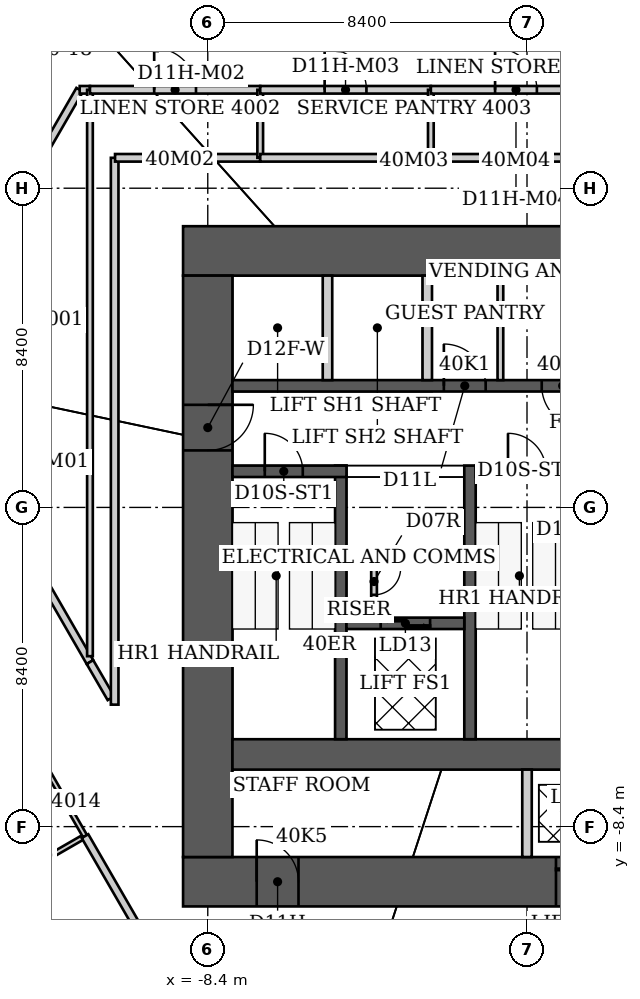
"""IFC4 building model, lengths in metres.
Left out: names, types, materials, properties, quantities, classifications, styles, units other than length and angle.
Written with IfcOpenShell. Run it as: python <this file> out.ifc"""

import sys

from ifc_helpers import new_model, si_unit, direction, frame, frame_2d, origin, place, context, subcontext, project, spatial, rectangle, extrude, element, fill, save


model = new_model("IFC4")
c1 = context("Model", 3, precision=1e-05, world=origin(), true_north=direction((0.0, 1.0)))
c2 = subcontext(c1, "Body", "Model", "MODEL_VIEW")
j1 = project(units=[si_unit("LENGTHUNIT", "METRE"), si_unit("PLANEANGLEUNIT", "RADIAN")], contexts=[c1])
p1 = place(None, origin())
s1 = spatial("IfcSite", under=j1, at=p1, CompositionType="ELEMENT")
p2 = place(p1, origin())
s2 = spatial("IfcBuilding", under=s1, at=p2, CompositionType="ELEMENT")
p3 = place(p2, frame((0.0, 0.0, 161.4)))
s3 = spatial("IfcBuildingStorey", under=s2, at=p3, CompositionType="ELEMENT", Elevation=161.4)
p4 = place(p3, frame((-9.05, 6.75, 0.0), z_axis=(0.0, 0.0, 1.0), x_axis=(1.0, 0.0, 0.0)))
e1 = element("IfcWall", 1, at=p4, inside=s3, PredefinedType="SHEAR", context=c2, shape_type="SweptSolid", body=[
    extrude(rectangle(XDim=18.1, YDim=1.3, at=frame_2d((9.05, 0.0))), origin(), (0.0, 0.0, 1.0), 3.8),
])
p5 = place(p3, frame((-9.05, -9.85, 0.0), z_axis=(0.0, 0.0, 1.0), x_axis=(1.0, 0.0, 0.0)))
e2 = element("IfcWall", 2, at=p5, inside=s3, PredefinedType="SHEAR", context=c2, shape_type="SweptSolid", body=[
    extrude(rectangle(XDim=18.1, YDim=1.3, at=frame_2d((9.05, 0.0))), origin(), (0.0, 0.0, 1.0), 3.8),
])
p6 = place(p5, frame((1.938, 0.0, 0.0)))
e3 = element("IfcOpeningElement", 3, at=p6, cuts=e2, PredefinedType="OPENING", context=c2, shape_type="SweptSolid", body=[
    extrude(rectangle(XDim=1.1, YDim=2.2, at=frame_2d((0.55, 1.1))), frame((0.0, 0.65, 0.0), z_axis=(0.0, -1.0, 0.0), x_axis=(1.0, 0.0, 0.0)), (0.0, 0.0, 1.0), 1.3),
])
p7 = place(p5, frame((9.812, 0.0, 0.0)))
e4 = element("IfcOpeningElement", 4, at=p7, cuts=e2, PredefinedType="OPENING", context=c2, shape_type="SweptSolid", body=[
    extrude(rectangle(XDim=1.1, YDim=2.1, at=frame_2d((0.55, 1.05))), frame((0.0, 0.65, 0.0), z_axis=(0.0, -1.0, 0.0), x_axis=(1.0, 0.0, 0.0)), (0.0, 0.0, 1.0), 1.3),
])
p8 = place(p5, frame((12.438, 0.0, 0.0)))
e5 = element("IfcOpeningElement", 5, at=p8, cuts=e2, PredefinedType="OPENING", context=c2, shape_type="SweptSolid", body=[
    extrude(rectangle(XDim=1.1, YDim=2.1, at=frame_2d((0.55, 1.05))), frame((0.0, 0.65, 0.0), z_axis=(0.0, -1.0, 0.0), x_axis=(1.0, 0.0, 0.0)), (0.0, 0.0, 1.0), 1.3),
])
p9 = place(p5, frame((15.062, 0.0, 0.0)))
e6 = element("IfcOpeningElement", 6, at=p9, cuts=e2, PredefinedType="OPENING", context=c2, shape_type="SweptSolid", body=[
    extrude(rectangle(XDim=1.1, YDim=2.1, at=frame_2d((0.55, 1.05))), frame((0.0, 0.65, 0.0), z_axis=(0.0, -1.0, 0.0), x_axis=(1.0, 0.0, 0.0)), (0.0, 0.0, 1.0), 1.3),
])
p10 = place(p3, frame((-8.4, -9.2, 0.0), z_axis=(0.0, 0.0, 1.0), x_axis=(0.0, 1.0, 0.0)))
e7 = element("IfcWall", 7, at=p10, inside=s3, PredefinedType="SHEAR", context=c2, shape_type="SweptSolid", body=[
    extrude(rectangle(XDim=15.3, YDim=1.3, at=frame_2d((7.65, 0.0))), origin(), (0.0, 0.0, 1.0), 3.8),
])
p11 = place(p10, frame((10.7, 0.0, 0.0)))
e8 = element("IfcOpeningElement", 8, at=p11, cuts=e7, PredefinedType="OPENING", context=c2, shape_type="SweptSolid", body=[
    extrude(rectangle(XDim=1.2, YDim=2.2, at=frame_2d((0.6, 1.1))), frame((0.0, 0.65, 0.0), z_axis=(0.0, -1.0, 0.0), x_axis=(1.0, 0.0, 0.0)), (0.0, 0.0, 1.0), 1.3),
])
p12 = place(p3, frame((-7.75, -6.5, 0.0), z_axis=(0.0, 0.0, 1.0), x_axis=(1.0, 0.0, 0.0)))
e9 = element("IfcWall", 9, at=p12, inside=s3, PredefinedType="SHEAR", context=c2, shape_type="SweptSolid", body=[
    extrude(rectangle(XDim=15.5, YDim=0.8, at=frame_2d((7.75, 0.0))), origin(), (0.0, 0.0, 1.0), 3.8),
])
for number, where, z_axis, x_axis in (
    (10, (-4.9, -6.1, 0.0), (0.0, 0.0, 1.0), (0.0, 1.0, 0.0)),
    (11, (-1.5, -6.1, 0.0), (0.0, 0.0, 1.0), (0.0, 1.0, 0.0)),
):
    element("IfcWall", number, at=place(p3, frame(where, z_axis=z_axis, x_axis=x_axis)), inside=s3, PredefinedType="SHEAR", context=c2, shape_type="SweptSolid", body=[
        extrude(rectangle(XDim=7.2, YDim=0.3, at=frame_2d((3.6, 0.0))), origin(), (0.0, 0.0, 1.0), 3.8),
    ])
p13 = place(p3, frame((-7.75, 0.95, 0.0), z_axis=(0.0, 0.0, 1.0), x_axis=(1.0, 0.0, 0.0)))
e12 = element("IfcWall", 12, at=p13, inside=s3, PredefinedType="SHEAR", context=c2, shape_type="SweptSolid", body=[
    extrude(rectangle(XDim=3.0, YDim=0.3, at=frame_2d((1.5, 0.0))), origin(), (0.0, 0.0, 1.0), 3.8),
])
p14 = place(p13, frame((0.85, 0.0, 0.0)))
e13 = element("IfcOpeningElement", 13, at=p14, cuts=e12, PredefinedType="OPENING", context=c2, shape_type="SweptSolid", body=[
    extrude(rectangle(XDim=1.0, YDim=2.2, at=frame_2d((0.5, 1.1))), frame((0.0, 0.15, 0.0), z_axis=(0.0, -1.0, 0.0), x_axis=(1.0, 0.0, 0.0)), (0.0, 0.0, 1.0), 0.3),
])
p15 = place(p3, frame((-1.35, 0.95, 0.0), z_axis=(0.0, 0.0, 1.0), x_axis=(1.0, 0.0, 0.0)))
e14 = element("IfcWall", 14, at=p15, inside=s3, PredefinedType="SHEAR", context=c2, shape_type="SweptSolid", body=[
    extrude(rectangle(XDim=2.7, YDim=0.3, at=frame_2d((1.35, 0.0))), origin(), (0.0, 0.0, 1.0), 3.8),
])
p16 = place(p15, frame((0.85, 0.0, 0.0)))
e15 = element("IfcOpeningElement", 15, at=p16, cuts=e14, PredefinedType="OPENING", context=c2, shape_type="SweptSolid", body=[
    extrude(rectangle(XDim=1.0, YDim=2.2, at=frame_2d((0.5, 1.1))), frame((0.0, 0.15, 0.0), z_axis=(0.0, -1.0, 0.0), x_axis=(1.0, 0.0, 0.0)), (0.0, 0.0, 1.0), 0.3),
])
p17 = place(p3, frame((-4.75, -3.05, 0.0), z_axis=(0.0, 0.0, 1.0), x_axis=(1.0, 0.0, 0.0)))
e16 = element("IfcWall", 16, at=p17, inside=s3, PredefinedType="SHEAR", context=c2, shape_type="SweptSolid", body=[
    extrude(rectangle(XDim=3.1, YDim=0.3, at=frame_2d((1.55, 0.0))), origin(), (0.0, 0.0, 1.0), 3.8),
])
p18 = place(p17, frame((0.9, 0.0, 0.0)))
e17 = element("IfcOpeningElement", 17, at=p18, cuts=e16, PredefinedType="OPENING", context=c2, shape_type="SweptSolid", body=[
    extrude(rectangle(XDim=1.3, YDim=2.1, at=frame_2d((0.65, 1.05))), frame((0.0, 0.15, 0.0), z_axis=(0.0, -1.0, 0.0), x_axis=(1.0, 0.0, 0.0)), (0.0, 0.0, 1.0), 0.3),
])
p19 = place(p3, frame((-7.75, 3.2, 0.0), z_axis=(0.0, 0.0, 1.0), x_axis=(1.0, 0.0, 0.0)))
e18 = element("IfcWall", 18, at=p19, inside=s3, PredefinedType="SHEAR", context=c2, shape_type="SweptSolid", body=[
    extrude(rectangle(XDim=15.5, YDim=0.3, at=frame_2d((7.75, 0.0))), origin(), (0.0, 0.0, 1.0), 3.8),
])
p20 = place(p19, frame((5.562, 0.0, 0.0)))
e19 = element("IfcOpeningElement", 19, at=p20, cuts=e18, PredefinedType="OPENING", context=c2, shape_type="SweptSolid", body=[
    extrude(rectangle(XDim=1.1, YDim=2.2, at=frame_2d((0.55, 1.1))), frame((0.0, 0.15, 0.0), z_axis=(0.0, -1.0, 0.0), x_axis=(1.0, 0.0, 0.0)), (0.0, 0.0, 1.0), 0.3),
])
p21 = place(p19, frame((8.137, 0.0, 0.0)))
e20 = element("IfcOpeningElement", 20, at=p21, cuts=e18, PredefinedType="OPENING", context=c2, shape_type="SweptSolid", body=[
    extrude(rectangle(XDim=1.1, YDim=2.2, at=frame_2d((0.55, 1.1))), frame((0.0, 0.15, 0.0), z_axis=(0.0, -1.0, 0.0), x_axis=(1.0, 0.0, 0.0)), (0.0, 0.0, 1.0), 0.3),
])
p22 = place(p19, frame((10.812, 0.0, 0.0)))
e21 = element("IfcOpeningElement", 21, at=p22, cuts=e18, PredefinedType="OPENING", context=c2, shape_type="SweptSolid", body=[
    extrude(rectangle(XDim=1.1, YDim=2.2, at=frame_2d((0.55, 1.1))), frame((0.0, 0.15, 0.0), z_axis=(0.0, -1.0, 0.0), x_axis=(1.0, 0.0, 0.0)), (0.0, 0.0, 1.0), 0.3),
])
p23 = place(p19, frame((13.387, 0.0, 0.0)))
e22 = element("IfcOpeningElement", 22, at=p23, cuts=e18, PredefinedType="OPENING", context=c2, shape_type="SweptSolid", body=[
    extrude(rectangle(XDim=1.1, YDim=2.2, at=frame_2d((0.55, 1.1))), frame((0.0, 0.15, 0.0), z_axis=(0.0, -1.0, 0.0), x_axis=(1.0, 0.0, 0.0)), (0.0, 0.0, 1.0), 0.3),
])
for number, where, z_axis, x_axis in (
    (23, (-5.25, 3.35, 0.0), (0.0, 0.0, 1.0), (0.0, 1.0, 0.0)),
    (24, (-2.625, 3.35, 0.0), (0.0, 0.0, 1.0), (0.0, 1.0, 0.0)),
):
    element("IfcWall", number, at=place(p3, frame(where, z_axis=z_axis, x_axis=x_axis)), inside=s3, PredefinedType="PARTITIONING", context=c2, shape_type="SweptSolid", body=[
        extrude(rectangle(XDim=2.75, YDim=0.25, at=frame_2d((1.375, 0.0))), origin(), (0.0, 0.0, 1.0), 3.8),
    ])
p24 = place(p3, frame((0.0, -9.2, 0.0), z_axis=(0.0, 0.0, 1.0), x_axis=(0.0, 1.0, 0.0)))
e25 = element("IfcWall", 25, at=p24, inside=s3, PredefinedType="PARTITIONING", context=c2, shape_type="SweptSolid", body=[
    extrude(rectangle(XDim=2.3, YDim=0.25, at=frame_2d((1.15, 0.0))), origin(), (0.0, 0.0, 1.0), 3.8),
])
p25 = place(p3, frame((-15.98, 3.7, 0.0), z_axis=(0.0, 0.0, 1.0), x_axis=(0.500093981358, 0.865971136822, 0.0)))
e26 = element("IfcWall", 26, at=p25, inside=s3, PredefinedType="PARTITIONING", context=c2, shape_type="SweptSolid", body=[
    extrude(rectangle(XDim=8.418, YDim=0.2, at=frame_2d((4.209, 0.0))), origin(), (0.0, 0.0, 1.0), 3.64),
])
p26 = place(p3, frame((-13.66, -9.82, 0.0), z_axis=(0.0, 0.0, 1.0), x_axis=(0.866345142729, 0.499445786517, 0.0)))
e27 = element("IfcWall", 27, at=p26, inside=s3, PredefinedType="PARTITIONING", context=c2, shape_type="SweptSolid", body=[
    extrude(rectangle(XDim=2.343, YDim=0.12, at=frame_2d((1.171, 0.0))), origin(), (0.0, 0.0, 1.0), 3.64),
])
p27 = place(p3, frame((-12.89, -6.46, 0.0), z_axis=(0.0, 0.0, 1.0), x_axis=(0.498707120669, -0.866770562372, 0.0)))
e28 = element("IfcWall", 28, at=p27, inside=s3, PredefinedType="PARTITIONING", context=c2, shape_type="SweptSolid", body=[
    extrude(rectangle(XDim=2.527, YDim=0.12, at=frame_2d((1.263, 0.0))), origin(), (0.0, 0.0, 1.0), 3.64),
])
p28 = place(p3, frame((-11.77, 10.99, 0.0), z_axis=(0.0, 0.0, 1.0), x_axis=(1.0, 0.0, 0.0)))
e29 = element("IfcWall", 29, at=p28, inside=s3, PredefinedType="PARTITIONING", context=c2, shape_type="SweptSolid", body=[
    extrude(rectangle(XDim=0.27, YDim=0.2, at=frame_2d((0.135, 0.0))), origin(), (0.0, 0.0, 1.0), 3.64),
])
p29 = place(p3, frame((-11.63, -8.65, 0.0), z_axis=(0.0, 0.0, 1.0), x_axis=(0.500367528775, -0.865813106939, 0.0)))
e30 = element("IfcWall", 30, at=p29, inside=s3, PredefinedType="PARTITIONING", context=c2, shape_type="SweptSolid", body=[
    extrude(rectangle(XDim=8.593, YDim=0.2, at=frame_2d((4.297, 0.0))), origin(), (0.0, 0.0, 1.0), 3.64),
])
p30 = place(p29, frame((3.797, 0.0, 0.0)))
e31 = element("IfcOpeningElement", 31, at=p30, cuts=e30, PredefinedType="OPENING", context=c2, shape_type="SweptSolid", body=[
    extrude(rectangle(XDim=1.0, YDim=2.13, at=frame_2d((0.5, 1.065))), frame((0.0, 0.1, 0.0), z_axis=(0.0, -1.0, 0.0), x_axis=(1.0, 0.0, 0.0)), (0.0, 0.0, 1.0), 0.2),
])
p31 = place(p3, frame((-11.5, -4.07, 0.0), z_axis=(0.0, 0.0, 1.0), x_axis=(-0.499494642712, 0.86631697542, 0.0)))
e32 = element("IfcWall", 32, at=p31, inside=s3, PredefinedType="PARTITIONING", context=c2, shape_type="SweptSolid", body=[
    extrude(rectangle(XDim=8.969, YDim=0.2, at=frame_2d((4.484, 0.0))), origin(), (0.0, 0.0, 1.0), 3.64),
])
p32 = place(p31, frame((3.935, 0.0, 0.0)))
e33 = element("IfcOpeningElement", 33, at=p32, cuts=e32, PredefinedType="OPENING", context=c2, shape_type="SweptSolid", body=[
    extrude(rectangle(XDim=1.1, YDim=2.2, at=frame_2d((0.55, 1.1))), frame((0.0, 0.1, 0.0), z_axis=(0.0, -1.0, 0.0), x_axis=(1.0, 0.0, 0.0)), (0.0, 0.0, 1.0), 0.2),
])
p33 = place(p3, frame((-11.5, 10.99, 0.0), z_axis=(0.0, 0.0, 1.0), x_axis=(0.0, -1.0, 0.0)))
e34 = element("IfcWall", 34, at=p33, inside=s3, PredefinedType="PARTITIONING", context=c2, shape_type="SweptSolid", body=[
    extrude(rectangle(XDim=14.905, YDim=0.15, at=frame_2d((7.453, 0.0))), origin(), (0.0, 0.0, 1.0), 3.64),
])
p34 = place(p3, frame((-11.5, 10.99, 0.0), z_axis=(0.0, 0.0, 1.0), x_axis=(1.0, 0.0, 0.0)))
e35 = element("IfcWall", 35, at=p34, inside=s3, PredefinedType="PARTITIONING", context=c2, shape_type="SweptSolid", body=[
    extrude(rectangle(XDim=4.48, YDim=0.2, at=frame_2d((2.24, 0.0))), origin(), (0.0, 0.0, 1.0), 3.64),
])
p35 = place(p34, frame((1.69, 0.0, 0.0)))
e36 = element("IfcOpeningElement", 36, at=p35, cuts=e35, PredefinedType="OPENING", context=c2, shape_type="SweptSolid", body=[
    extrude(rectangle(XDim=1.1, YDim=2.2, at=frame_2d((0.55, 1.1))), frame((0.0, 0.1, 0.0), z_axis=(0.0, -1.0, 0.0), x_axis=(1.0, 0.0, 0.0)), (0.0, 0.0, 1.0), 0.2),
])
p36 = place(p3, frame((-10.948, -5.021, 0.0), z_axis=(0.0, 0.0, 1.0), x_axis=(-0.501937347286, 0.864903982763, 0.0)))
e37 = element("IfcWall", 37, at=p36, inside=s3, PredefinedType="PARTITIONING", context=c2, shape_type="SweptSolid", body=[
    extrude(rectangle(XDim=1.1, YDim=0.2, at=frame_2d((0.55, 0.0))), origin(), (0.0, 0.0, 1.0), 3.64),
])
p37 = place(p3, frame((-10.85, 9.2, 0.0), z_axis=(0.0, 0.0, 1.0), x_axis=(0.0, -1.0, 0.0)))
e38 = element("IfcWall", 38, at=p37, inside=s3, PredefinedType="PARTITIONING", context=c2, shape_type="SweptSolid", body=[
    extrude(rectangle(XDim=14.39, YDim=0.2, at=frame_2d((7.195, 0.0))), origin(), (0.0, 0.0, 1.0), 3.64),
])
p38 = place(p3, frame((-7.02, 9.2, 0.0), z_axis=(0.0, 0.0, 1.0), x_axis=(-1.0, 0.0, 0.0)))
e39 = element("IfcWall", 39, at=p38, inside=s3, PredefinedType="PARTITIONING", context=c2, shape_type="SweptSolid", body=[
    extrude(rectangle(XDim=3.82, YDim=0.2, at=frame_2d((1.91, 0.0))), origin(), (0.0, 0.0, 1.0), 3.64),
])
p39 = place(p3, frame((-7.02, 10.99, 0.0), z_axis=(0.0, 0.0, 1.0), x_axis=(0.0, -1.0, 0.0)))
e40 = element("IfcWall", 40, at=p39, inside=s3, PredefinedType="PARTITIONING", context=c2, shape_type="SweptSolid", body=[
    extrude(rectangle(XDim=1.79, YDim=0.15, at=frame_2d((0.895, 0.0))), origin(), (0.0, 0.0, 1.0), 3.64),
])
p40 = place(p3, frame((-7.02, 10.99, 0.0), z_axis=(0.0, 0.0, 1.0), x_axis=(1.0, 0.0, 0.0)))
e41 = element("IfcWall", 41, at=p40, inside=s3, PredefinedType="PARTITIONING", context=c2, shape_type="SweptSolid", body=[
    extrude(rectangle(XDim=4.49, YDim=0.2, at=frame_2d((2.245, 0.0))), origin(), (0.0, 0.0, 1.0), 3.64),
])
p41 = place(p40, frame((1.695, 0.0, 0.0)))
e42 = element("IfcOpeningElement", 42, at=p41, cuts=e41, PredefinedType="OPENING", context=c2, shape_type="SweptSolid", body=[
    extrude(rectangle(XDim=1.1, YDim=2.2, at=frame_2d((0.55, 1.1))), frame((0.0, 0.1, 0.0), z_axis=(0.0, -1.0, 0.0), x_axis=(1.0, 0.0, 0.0)), (0.0, 0.0, 1.0), 0.2),
])
p42 = place(p3, frame((-2.53, 9.2, 0.0), z_axis=(0.0, 0.0, 1.0), x_axis=(-1.0, 0.0, 0.0)))
e43 = element("IfcWall", 43, at=p42, inside=s3, PredefinedType="PARTITIONING", context=c2, shape_type="SweptSolid", body=[
    extrude(rectangle(XDim=4.49, YDim=0.2, at=frame_2d((2.245, 0.0))), origin(), (0.0, 0.0, 1.0), 3.64),
])
p43 = place(p3, frame((-2.53, 10.99, 0.0), z_axis=(0.0, 0.0, 1.0), x_axis=(0.0, -1.0, 0.0)))
e44 = element("IfcWall", 44, at=p43, inside=s3, PredefinedType="PARTITIONING", context=c2, shape_type="SweptSolid", body=[
    extrude(rectangle(XDim=1.79, YDim=0.15, at=frame_2d((0.895, 0.0))), origin(), (0.0, 0.0, 1.0), 3.64),
])
p44 = place(p3, frame((-2.53, 10.99, 0.0), z_axis=(0.0, 0.0, 1.0), x_axis=(1.0, 0.0, 0.0)))
e45 = element("IfcWall", 45, at=p44, inside=s3, PredefinedType="PARTITIONING", context=c2, shape_type="SweptSolid", body=[
    extrude(rectangle(XDim=4.48, YDim=0.2, at=frame_2d((2.24, 0.0))), origin(), (0.0, 0.0, 1.0), 3.64),
])
p45 = place(p44, frame((1.69, 0.0, 0.0)))
e46 = element("IfcOpeningElement", 46, at=p45, cuts=e45, PredefinedType="OPENING", context=c2, shape_type="SweptSolid", body=[
    extrude(rectangle(XDim=1.1, YDim=2.2, at=frame_2d((0.55, 1.1))), frame((0.0, 0.1, 0.0), z_axis=(0.0, -1.0, 0.0), x_axis=(1.0, 0.0, 0.0)), (0.0, 0.0, 1.0), 0.2),
])
p46 = place(p3, frame((1.95, 9.2, 0.0), z_axis=(0.0, 0.0, 1.0), x_axis=(-1.0, 0.0, 0.0)))
e47 = element("IfcWall", 47, at=p46, inside=s3, PredefinedType="PARTITIONING", context=c2, shape_type="SweptSolid", body=[
    extrude(rectangle(XDim=4.48, YDim=0.2, at=frame_2d((2.24, 0.0))), origin(), (0.0, 0.0, 1.0), 3.64),
])
p47 = place(p3, frame((-4.025, -2.9, 0.0), z_axis=(0.0, 0.0, 1.0), x_axis=(0.0, 1.0, 0.0)))
e48 = element("IfcWall", 48, at=p47, inside=s3, PredefinedType="PARTITIONING", context=c2, shape_type="SweptSolid", body=[
    extrude(rectangle(XDim=1.775, YDim=0.15, at=frame_2d((0.887, 0.0))), origin(), (0.0, 0.0, 1.0), 3.64),
])
p48 = place(p47, frame((0.6, 0.0, 0.0)))
e49 = element("IfcOpeningElement", 49, at=p48, cuts=e48, PredefinedType="OPENING", context=c2, shape_type="SweptSolid", body=[
    extrude(rectangle(XDim=0.7, YDim=2.1, at=frame_2d((0.35, 1.05))), frame((0.0, 0.075, 0.0), z_axis=(0.0, -1.0, 0.0), x_axis=(1.0, 0.0, 0.0)), (0.0, 0.0, 1.0), 0.15),
])
p49 = place(p3, frame((-4.75, -1.2, 0.0), z_axis=(0.0, 0.0, 1.0), x_axis=(1.0, 0.0, 0.0)))
e50 = element("IfcWall", 50, at=p49, inside=s3, PredefinedType="PARTITIONING", context=c2, shape_type="SweptSolid", body=[
    extrude(rectangle(XDim=0.8, YDim=0.15, at=frame_2d((0.4, 0.0))), origin(), (0.0, 0.0, 1.0), 3.64),
])
p50 = place(p3, frame((-0.7, 3.35, 0.0), z_axis=(0.0, 0.0, 1.0), x_axis=(0.0, 1.0, 0.0)))
e51 = element("IfcWall", 51, at=p50, inside=s3, PredefinedType="PARTITIONING", context=c2, shape_type="SweptSolid", body=[
    extrude(rectangle(XDim=2.75, YDim=0.15, at=frame_2d((1.375, 0.0))), origin(), (0.0, 0.0, 1.0), 3.64),
])
p51 = place(p35, origin())
e52 = element("IfcDoor", 52, at=p51, inside=s3, OperationType="SINGLE_SWING_LEFT", PredefinedType="DOOR", context=c2, shape_type="SweptSolid", body=[
    extrude(rectangle(XDim=1.1, YDim=2.2, at=frame_2d((0.55, 1.1))), frame((0.0, 0.025, 0.0), z_axis=(0.0, -1.0, 0.0), x_axis=(1.0, 0.0, 0.0)), (0.0, 0.0, 1.0), 0.05),
])
fill(e36, e52)
p52 = place(p41, origin())
e53 = element("IfcDoor", 53, at=p52, inside=s3, OperationType="SINGLE_SWING_LEFT", PredefinedType="DOOR", context=c2, shape_type="SweptSolid", body=[
    extrude(rectangle(XDim=1.1, YDim=2.2, at=frame_2d((0.55, 1.1))), frame((0.0, 0.025, 0.0), z_axis=(0.0, -1.0, 0.0), x_axis=(1.0, 0.0, 0.0)), (0.0, 0.0, 1.0), 0.05),
])
fill(e42, e53)
p53 = place(p45, origin())
e54 = element("IfcDoor", 54, at=p53, inside=s3, OperationType="SINGLE_SWING_LEFT", PredefinedType="DOOR", context=c2, shape_type="SweptSolid", body=[
    extrude(rectangle(XDim=1.1, YDim=2.2, at=frame_2d((0.55, 1.1))), frame((0.0, 0.025, 0.0), z_axis=(0.0, -1.0, 0.0), x_axis=(1.0, 0.0, 0.0)), (0.0, 0.0, 1.0), 0.05),
])
fill(e46, e54)
p54 = place(p14, origin())
e55 = element("IfcDoor", 55, at=p54, inside=s3, OperationType="SINGLE_SWING_LEFT", PredefinedType="DOOR", context=c2, shape_type="SweptSolid", body=[
    extrude(rectangle(XDim=1.0, YDim=2.2, at=frame_2d((0.5, 1.1))), frame((0.0, 0.025, 0.0), z_axis=(0.0, -1.0, 0.0), x_axis=(1.0, 0.0, 0.0)), (0.0, 0.0, 1.0), 0.05),
])
fill(e13, e55)
p55 = place(p16, origin())
e56 = element("IfcDoor", 56, at=p55, inside=s3, OperationType="SINGLE_SWING_LEFT", PredefinedType="DOOR", context=c2, shape_type="SweptSolid", body=[
    extrude(rectangle(XDim=1.0, YDim=2.2, at=frame_2d((0.5, 1.1))), frame((0.0, 0.025, 0.0), z_axis=(0.0, -1.0, 0.0), x_axis=(1.0, 0.0, 0.0)), (0.0, 0.0, 1.0), 0.05),
])
fill(e15, e56)
p56 = place(p11, origin())
e57 = element("IfcDoor", 57, at=p56, inside=s3, OperationType="SINGLE_SWING_RIGHT", PredefinedType="DOOR", context=c2, shape_type="SweptSolid", body=[
    extrude(rectangle(XDim=1.2, YDim=2.2, at=frame_2d((0.6, 1.1))), frame((0.0, 0.025, 0.0), z_axis=(0.0, -1.0, 0.0), x_axis=(1.0, 0.0, 0.0)), (0.0, 0.0, 1.0), 0.05),
])
fill(e8, e57)
p57 = place(p48, origin())
e58 = element("IfcDoor", 58, at=p57, inside=s3, OperationType="SINGLE_SWING_RIGHT", PredefinedType="DOOR", context=c2, shape_type="SweptSolid", body=[
    extrude(rectangle(XDim=0.7, YDim=2.1, at=frame_2d((0.35, 1.05))), frame((0.0, 0.025, 0.0), z_axis=(0.0, -1.0, 0.0), x_axis=(1.0, 0.0, 0.0)), (0.0, 0.0, 1.0), 0.05),
])
fill(e49, e58)
p58 = place(p20, origin())
e59 = element("IfcDoor", 59, at=p58, inside=s3, OperationType="SINGLE_SWING_LEFT", PredefinedType="DOOR", context=c2, shape_type="SweptSolid", body=[
    extrude(rectangle(XDim=1.1, YDim=2.2, at=frame_2d((0.55, 1.1))), frame((0.0, 0.025, 0.0), z_axis=(0.0, -1.0, 0.0), x_axis=(1.0, 0.0, 0.0)), (0.0, 0.0, 1.0), 0.05),
])
fill(e19, e59)
p59 = place(p21, origin())
e60 = element("IfcDoor", 60, at=p59, inside=s3, OperationType="SINGLE_SWING_RIGHT", PredefinedType="DOOR", context=c2, shape_type="SweptSolid", body=[
    extrude(rectangle(XDim=1.1, YDim=2.2, at=frame_2d((0.55, 1.1))), frame((0.0, 0.025, 0.0), z_axis=(0.0, -1.0, 0.0), x_axis=(1.0, 0.0, 0.0)), (0.0, 0.0, 1.0), 0.05),
])
fill(e20, e60)
p60 = place(p6, origin())
e61 = element("IfcDoor", 61, at=p60, inside=s3, OperationType="SINGLE_SWING_LEFT", PredefinedType="DOOR", context=c2, shape_type="SweptSolid", body=[
    extrude(rectangle(XDim=1.1, YDim=2.2, at=frame_2d((0.55, 1.1))), frame((0.0, 0.025, 0.0), z_axis=(0.0, -1.0, 0.0), x_axis=(1.0, 0.0, 0.0)), (0.0, 0.0, 1.0), 0.05),
])
fill(e3, e61)
p61 = place(p7, origin())
e62 = element("IfcDoor", 62, at=p61, inside=s3, OperationType="DOUBLE_DOOR_SLIDING", PredefinedType="DOOR", context=c2, shape_type="SweptSolid", body=[
    extrude(rectangle(XDim=1.1, YDim=2.1, at=frame_2d((0.55, 1.05))), frame((0.0, 0.025, 0.0), z_axis=(0.0, -1.0, 0.0), x_axis=(1.0, 0.0, 0.0)), (0.0, 0.0, 1.0), 0.05),
])
fill(e4, e62)
p62 = place(p18, origin())
e63 = element("IfcDoor", 63, at=p62, inside=s3, OperationType="DOUBLE_DOOR_SLIDING", PredefinedType="DOOR", context=c2, shape_type="SweptSolid", body=[
    extrude(rectangle(XDim=1.3, YDim=2.1, at=frame_2d((0.65, 1.05))), frame((0.0, 0.025, 0.0), z_axis=(0.0, -1.0, 0.0), x_axis=(1.0, 0.0, 0.0)), (0.0, 0.0, 1.0), 0.05),
])
fill(e17, e63)
save(model, sys.argv[1])
